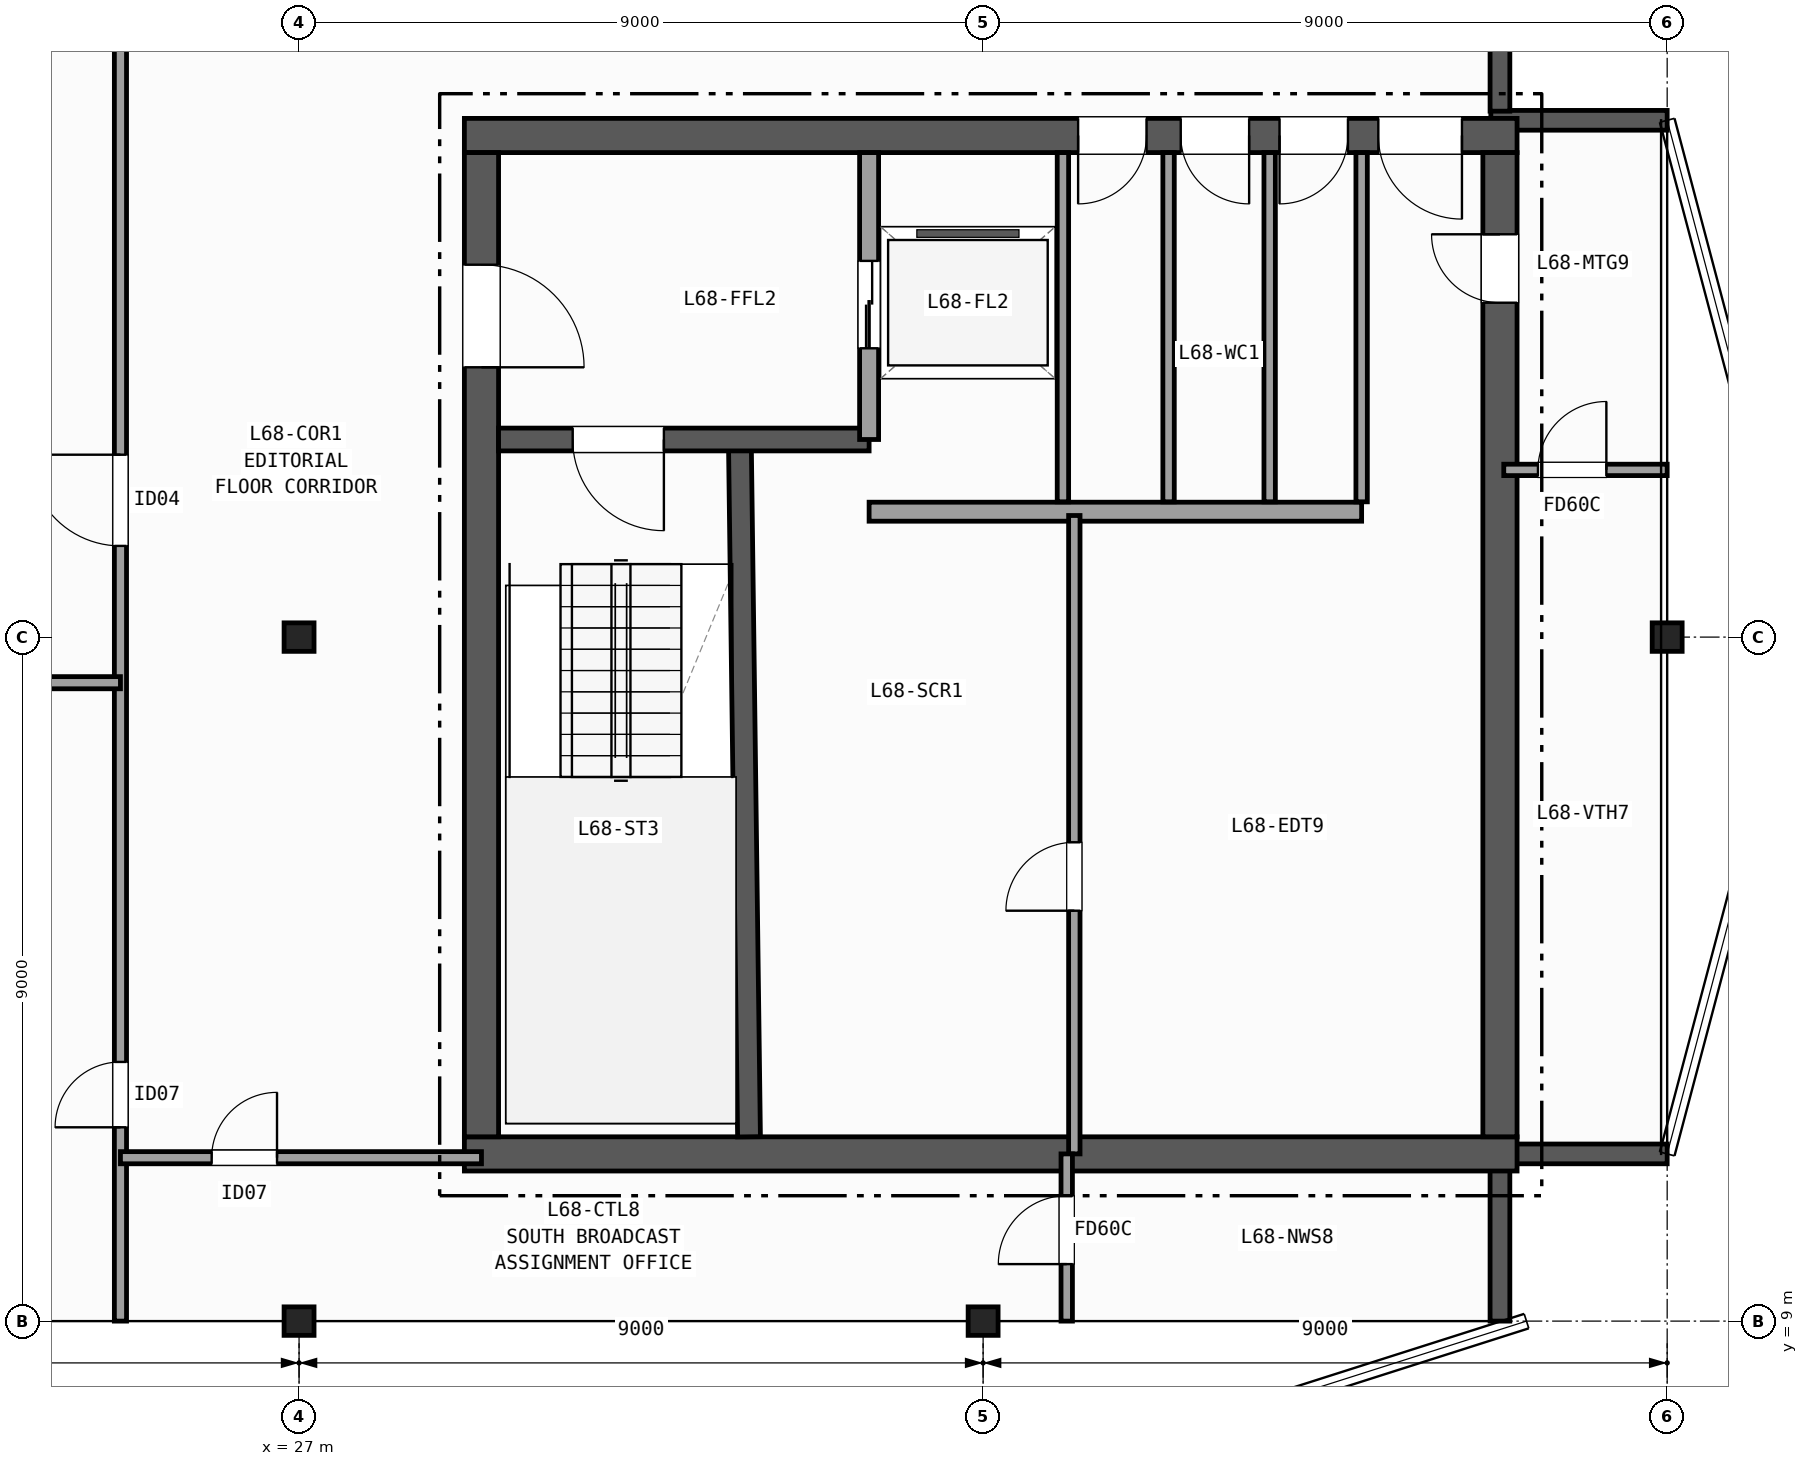
"""IFC4 building model, lengths in metres.
Left out: names, types, materials, properties, quantities, classifications, styles, units other than length and angle.
Written with IfcOpenShell. Run it as: python <this file> out.ifc"""

import sys

from ifc_helpers import new_model, si_unit, direction, frame, frame_2d, origin, origin_2d, place, context, subcontext, project, spatial, rectangle, i_section, extrude, element, fill, save


model = new_model("IFC4")
c1 = context("Model", 3, precision=1e-05, world=origin(), true_north=direction((0.0, 1.0)))
c2 = subcontext(c1, "Body", "Model", "MODEL_VIEW")
j1 = project(units=[si_unit("LENGTHUNIT", "METRE"), si_unit("PLANEANGLEUNIT", "RADIAN")], contexts=[c1])
p1 = place(None, origin())
s1 = spatial("IfcSite", under=j1, at=p1, CompositionType="ELEMENT")
p2 = place(p1, origin())
s2 = spatial("IfcBuilding", under=s1, at=p2, CompositionType="ELEMENT")
p3 = place(p2, frame((0.0, 0.0, 270.4)))
s3 = spatial("IfcBuildingStorey", under=s2, at=p3, CompositionType="ELEMENT", Elevation=270.4)
for number, where, z_axis, x_axis in (
    (1, (27.0, 9.0, 0.0), (0.0, 0.0, 1.0), (1.0, 0.0, 0.0)),
    (2, (27.0, 18.0, 0.0), (0.0, 0.0, 1.0), (1.0, 0.0, 0.0)),
    (3, (36.0, 9.0, 0.0), (0.0, 0.0, 1.0), (1.0, 0.0, 0.0)),
    (4, (45.0, 18.0, 0.0), (0.0, 0.0, 1.0), (1.0, 0.0, 0.0)),
):
    element("IfcColumn", number, at=place(p3, frame(where, z_axis=z_axis, x_axis=x_axis)), inside=s3, PredefinedType="COLUMN", context=c2, shape_type="SweptSolid", body=[
        extrude(i_section(OverallWidth=0.394, OverallDepth=0.375, WebThickness=0.017, FlangeThickness=0.028, FilletRadius=0.015, at=origin_2d()), origin(), (0.0, 0.0, 1.0), 3.7),
    ])
p4 = place(p3, frame((42.8, 9.0, 0.0), z_axis=(0.0, 0.0, 1.0), x_axis=(0.0, 1.0, 0.0)))
e5 = element("IfcWall", 5, at=p4, inside=s3, PredefinedType="SOLIDWALL", context=c2, shape_type="SweptSolid", body=[
    extrude(rectangle(XDim=2.08, YDim=0.26, at=frame_2d((1.04, 0.0))), origin(), (0.0, 0.0, 1.0), 3.42),
])
for number, where, z_axis, x_axis in (
    (6, (42.68, 11.2, 0.0), (0.0, 0.0, 1.0), (1.0, 0.0, 0.0)),
    (7, (45.0, 24.8, 0.0), (0.0, 0.0, 1.0), (-1.0, 0.0, 0.0)),
):
    element("IfcWall", number, at=place(p3, frame(where, z_axis=z_axis, x_axis=x_axis)), inside=s3, PredefinedType="SOLIDWALL", context=c2, shape_type="SweptSolid", body=[
        extrude(rectangle(XDim=2.32, YDim=0.26, at=frame_2d((1.16, 0.0))), origin(), (0.0, 0.0, 1.0), 3.42),
    ])
p5 = place(p3, frame((42.8, 24.92, 0.0), z_axis=(0.0, 0.0, 1.0), x_axis=(0.0, 1.0, 0.0)))
e8 = element("IfcWall", 8, at=p5, inside=s3, PredefinedType="SOLIDWALL", context=c2, shape_type="SweptSolid", body=[
    extrude(rectangle(XDim=2.08, YDim=0.26, at=frame_2d((1.04, 0.0))), origin(), (0.0, 0.0, 1.0), 3.42),
])
p6 = place(p3, frame((29.175, 11.2, 0.0), z_axis=(0.0, 0.0, 1.0), x_axis=(1.0, 0.0, 0.0)))
e9 = element("IfcWall", 9, at=p6, inside=s3, PredefinedType="SHEAR", context=c2, shape_type="SweptSolid", body=[
    extrude(rectangle(XDim=13.85, YDim=0.45, at=frame_2d((6.925, 0.0))), origin(), (0.0, 0.0, 1.0), 3.42),
])
p7 = place(p3, frame((43.025, 24.6, 0.0), z_axis=(0.0, 0.0, 1.0), x_axis=(-1.0, 0.0, 0.0)))
e10 = element("IfcWall", 10, at=p7, inside=s3, PredefinedType="SHEAR", context=c2, shape_type="SweptSolid", body=[
    extrude(rectangle(XDim=13.85, YDim=0.45, at=frame_2d((6.925, 0.0))), origin(), (0.0, 0.0, 1.0), 3.42),
])
p8 = place(p7, frame((0.725, 0.0, 0.0)))
e11 = element("IfcOpeningElement", 11, at=p8, cuts=e10, PredefinedType="OPENING", context=c2, shape_type="SweptSolid", body=[
    extrude(rectangle(XDim=1.1, YDim=2.15, at=frame_2d((0.55, 1.075))), frame((0.0, 0.235, 0.0), z_axis=(0.0, -1.0, 0.0), x_axis=(1.0, 0.0, 0.0)), (0.0, 0.0, 1.0), 0.47),
])
p9 = place(p7, frame((2.225, 0.0, 0.0)))
e12 = element("IfcOpeningElement", 12, at=p9, cuts=e10, PredefinedType="OPENING", context=c2, shape_type="SweptSolid", body=[
    extrude(rectangle(XDim=0.9, YDim=2.1, at=frame_2d((0.45, 1.05))), frame((0.0, 0.235, 0.0), z_axis=(0.0, -1.0, 0.0), x_axis=(1.0, 0.0, 0.0)), (0.0, 0.0, 1.0), 0.47),
])
p10 = place(p7, frame((3.525, 0.0, 0.0)))
e13 = element("IfcOpeningElement", 13, at=p10, cuts=e10, PredefinedType="OPENING", context=c2, shape_type="SweptSolid", body=[
    extrude(rectangle(XDim=0.9, YDim=2.1, at=frame_2d((0.45, 1.05))), frame((0.0, 0.235, 0.0), z_axis=(0.0, -1.0, 0.0), x_axis=(1.0, 0.0, 0.0)), (0.0, 0.0, 1.0), 0.47),
])
p11 = place(p7, frame((4.875, 0.0, 0.0)))
e14 = element("IfcOpeningElement", 14, at=p11, cuts=e10, PredefinedType="OPENING", context=c2, shape_type="SweptSolid", body=[
    extrude(rectangle(XDim=0.9, YDim=2.1, at=frame_2d((0.45, 1.05))), frame((0.0, 0.235, 0.0), z_axis=(0.0, -1.0, 0.0), x_axis=(1.0, 0.0, 0.0)), (0.0, 0.0, 1.0), 0.47),
])
p12 = place(p3, frame((29.4, 24.375, 0.0), z_axis=(0.0, 0.0, 1.0), x_axis=(0.0, -1.0, 0.0)))
e15 = element("IfcWall", 15, at=p12, inside=s3, PredefinedType="SHEAR", context=c2, shape_type="SweptSolid", body=[
    extrude(rectangle(XDim=12.95, YDim=0.45, at=frame_2d((6.475, 0.0))), origin(), (0.0, 0.0, 1.0), 3.42),
])
p13 = place(p12, frame((1.475, 0.0, 0.0)))
e16 = element("IfcOpeningElement", 16, at=p13, cuts=e15, PredefinedType="OPENING", context=c2, shape_type="SweptSolid", body=[
    extrude(rectangle(XDim=1.35, YDim=2.15, at=frame_2d((0.675, 1.075))), frame((0.0, 0.235, 0.0), z_axis=(0.0, -1.0, 0.0), x_axis=(1.0, 0.0, 0.0)), (0.0, 0.0, 1.0), 0.47),
])
p14 = place(p3, frame((42.8, 11.425, 0.0), z_axis=(0.0, 0.0, 1.0), x_axis=(0.0, 1.0, 0.0)))
e17 = element("IfcWall", 17, at=p14, inside=s3, PredefinedType="SHEAR", context=c2, shape_type="SweptSolid", body=[
    extrude(rectangle(XDim=12.95, YDim=0.45, at=frame_2d((6.475, 0.0))), origin(), (0.0, 0.0, 1.0), 3.42),
])
p15 = place(p14, frame((10.975, 0.0, 0.0)))
e18 = element("IfcOpeningElement", 18, at=p15, cuts=e17, PredefinedType="OPENING", context=c2, shape_type="SweptSolid", body=[
    extrude(rectangle(XDim=0.9, YDim=2.1, at=frame_2d((0.45, 1.05))), frame((0.0, 0.235, 0.0), z_axis=(0.0, -1.0, 0.0), x_axis=(1.0, 0.0, 0.0)), (0.0, 0.0, 1.0), 0.47),
])
p16 = place(p3, frame((32.92, 11.425, 0.0), z_axis=(0.0, 0.0, 1.0), x_axis=(-0.013135638869, 0.999913723774, 0.0)))
e19 = element("IfcWall", 19, at=p16, inside=s3, PredefinedType="SHEAR", context=c2, shape_type="SweptSolid", body=[
    extrude(rectangle(XDim=9.126, YDim=0.3, at=frame_2d((4.563, 0.0))), origin(), (0.0, 0.0, 1.0), 3.42),
])
p17 = place(p3, frame((34.5, 20.6, 0.0), z_axis=(0.0, 0.0, 1.0), x_axis=(-1.0, 0.0, 0.0)))
e20 = element("IfcWall", 20, at=p17, inside=s3, PredefinedType="SHEAR", context=c2, shape_type="SweptSolid", body=[
    extrude(rectangle(XDim=4.875, YDim=0.3, at=frame_2d((2.438, 0.0))), origin(), (0.0, 0.0, 1.0), 3.42),
])
p18 = place(p17, frame((2.7, 0.0, 0.0)))
e21 = element("IfcOpeningElement", 21, at=p18, cuts=e20, PredefinedType="OPENING", context=c2, shape_type="SweptSolid", body=[
    extrude(rectangle(XDim=1.2, YDim=2.15, at=frame_2d((0.6, 1.075))), frame((0.0, 0.16, 0.0), z_axis=(0.0, -1.0, 0.0), x_axis=(1.0, 0.0, 0.0)), (0.0, 0.0, 1.0), 0.32),
])
p19 = place(p3, frame((34.5, 20.6, 0.0), z_axis=(0.0, 0.0, 1.0), x_axis=(0.0, 1.0, 0.0)))
e22 = element("IfcWall", 22, at=p19, inside=s3, PredefinedType="PARTITIONING", context=c2, shape_type="SweptSolid", body=[
    extrude(rectangle(XDim=3.775, YDim=0.25, at=frame_2d((1.887, 0.0))), origin(), (0.0, 0.0, 1.0), 3.42),
])
p20 = place(p19, frame((1.2, 0.0, 0.0)))
e23 = element("IfcOpeningElement", 23, at=p20, cuts=e22, PredefinedType="OPENING", context=c2, shape_type="SweptSolid", body=[
    extrude(rectangle(XDim=1.15, YDim=2.15, at=frame_2d((0.575, 1.075))), frame((0.0, 0.135, 0.0), z_axis=(0.0, -1.0, 0.0), x_axis=(1.0, 0.0, 0.0)), (0.0, 0.0, 1.0), 0.27),
])
p21 = place(p3, frame((34.5, 19.65, 0.0), z_axis=(0.0, 0.0, 1.0), x_axis=(1.0, 0.0, 0.0)))
e24 = element("IfcWall", 24, at=p21, inside=s3, PredefinedType="PARTITIONING", context=c2, shape_type="SweptSolid", body=[
    extrude(rectangle(XDim=6.48, YDim=0.25, at=frame_2d((3.24, 0.0))), origin(), (0.0, 0.0, 1.0), 3.42),
])
p22 = place(p3, frame((37.2, 11.2, 0.0), z_axis=(0.0, 0.0, 1.0), x_axis=(0.0, 1.0, 0.0)))
e25 = element("IfcWall", 25, at=p22, inside=s3, PredefinedType="PARTITIONING", context=c2, shape_type="SweptSolid", body=[
    extrude(rectangle(XDim=8.4, YDim=0.15, at=frame_2d((4.2, 0.0))), origin(), (0.0, 0.0, 1.0), 3.42),
])
p23 = place(p22, frame((3.2, 0.0, 0.0)))
e26 = element("IfcOpeningElement", 26, at=p23, cuts=e25, PredefinedType="OPENING", context=c2, shape_type="SweptSolid", body=[
    extrude(rectangle(XDim=0.9, YDim=2.1, at=frame_2d((0.45, 1.05))), frame((0.0, 0.085, 0.0), z_axis=(0.0, -1.0, 0.0), x_axis=(1.0, 0.0, 0.0)), (0.0, 0.0, 1.0), 0.17),
])
for number, where, z_axis, x_axis in (
    (27, (37.05, 19.78, 0.0), (0.0, 0.0, 1.0), (0.0, 1.0, 0.0)),
    (28, (38.44, 19.78, 0.0), (0.0, 0.0, 1.0), (0.0, 1.0, 0.0)),
    (29, (39.77, 19.78, 0.0), (0.0, 0.0, 1.0), (0.0, 1.0, 0.0)),
    (30, (40.98, 19.78, 0.0), (0.0, 0.0, 1.0), (0.0, 1.0, 0.0)),
):
    element("IfcWall", number, at=place(p3, frame(where, z_axis=z_axis, x_axis=x_axis)), inside=s3, PredefinedType="PARTITIONING", context=c2, shape_type="SweptSolid", body=[
        extrude(rectangle(XDim=4.595, YDim=0.15, at=frame_2d((2.297, 0.0))), origin(), (0.0, 0.0, 1.0), 3.42),
    ])
p24 = place(p3, frame((24.65, 9.0, 0.0), z_axis=(0.0, 0.0, 1.0), x_axis=(0.0, 1.0, 0.0)))
e31 = element("IfcWall", 31, at=p24, inside=s3, PredefinedType="PARTITIONING", context=c2, shape_type="SweptSolid", body=[
    extrude(rectangle(XDim=19.2, YDim=0.16, at=frame_2d((9.6, 0.0))), origin(), (0.0, 0.0, 1.0), 2.707),
])
p25 = place(p24, frame((10.2, 0.0, 0.0)))
e32 = element("IfcOpeningElement", 32, at=p25, cuts=e31, PredefinedType="OPENING", context=c2, shape_type="SweptSolid", body=[
    extrude(rectangle(XDim=1.2, YDim=2.15, at=frame_2d((0.6, 1.075))), frame((0.0, 0.09, 0.0), z_axis=(0.0, -1.0, 0.0), x_axis=(1.0, 0.0, 0.0)), (0.0, 0.0, 1.0), 0.18),
])
p26 = place(p24, frame((2.55, 0.0, 0.0)))
e33 = element("IfcOpeningElement", 33, at=p26, cuts=e31, PredefinedType="OPENING", context=c2, shape_type="SweptSolid", body=[
    extrude(rectangle(XDim=0.86, YDim=2.05, at=frame_2d((0.43, 1.025))), frame((0.0, 0.09, 0.0), z_axis=(0.0, -1.0, 0.0), x_axis=(1.0, 0.0, 0.0)), (0.0, 0.0, 1.0), 0.18),
])
p27 = place(p3, frame((18.0, 17.4, 0.0), z_axis=(0.0, 0.0, 1.0), x_axis=(1.0, 0.0, 0.0)))
e34 = element("IfcWall", 34, at=p27, inside=s3, PredefinedType="PARTITIONING", context=c2, shape_type="SweptSolid", body=[
    extrude(rectangle(XDim=6.65, YDim=0.16, at=frame_2d((3.325, 0.0))), origin(), (0.0, 0.0, 1.0), 2.789),
])
p28 = place(p3, frame((24.65, 11.15, 0.0), z_axis=(0.0, 0.0, 1.0), x_axis=(1.0, 0.0, 0.0)))
e35 = element("IfcWall", 35, at=p28, inside=s3, PredefinedType="PARTITIONING", context=c2, shape_type="SweptSolid", body=[
    extrude(rectangle(XDim=4.75, YDim=0.16, at=frame_2d((2.375, 0.0))), origin(), (0.0, 0.0, 1.0), 2.792),
])
p29 = place(p28, frame((1.2, 0.0, 0.0)))
e36 = element("IfcOpeningElement", 36, at=p29, cuts=e35, PredefinedType="OPENING", context=c2, shape_type="SweptSolid", body=[
    extrude(rectangle(XDim=0.86, YDim=2.05, at=frame_2d((0.43, 1.025))), frame((0.0, 0.09, 0.0), z_axis=(0.0, -1.0, 0.0), x_axis=(1.0, 0.0, 0.0)), (0.0, 0.0, 1.0), 0.18),
])
p30 = place(p3, frame((37.1, 9.0, 0.0), z_axis=(0.0, 0.0, 1.0), x_axis=(0.0, 1.0, 0.0)))
e37 = element("IfcWall", 37, at=p30, inside=s3, PredefinedType="PARTITIONING", context=c2, shape_type="SweptSolid", body=[
    extrude(rectangle(XDim=2.2, YDim=0.15, at=frame_2d((1.1, 0.0))), origin(), (0.0, 0.0, 1.0), 3.42),
])
p31 = place(p30, frame((0.75, 0.0, 0.0)))
e38 = element("IfcOpeningElement", 38, at=p31, cuts=e37, PredefinedType="OPENING", context=c2, shape_type="SweptSolid", body=[
    extrude(rectangle(XDim=0.9, YDim=2.1, at=frame_2d((0.45, 1.05))), frame((0.0, 0.085, 0.0), z_axis=(0.0, -1.0, 0.0), x_axis=(1.0, 0.0, 0.0)), (0.0, 0.0, 1.0), 0.17),
])
p32 = place(p3, frame((42.85, 20.2, 0.0), z_axis=(0.0, 0.0, 1.0), x_axis=(1.0, 0.0, 0.0)))
e39 = element("IfcWall", 39, at=p32, inside=s3, PredefinedType="PARTITIONING", context=c2, shape_type="SweptSolid", body=[
    extrude(rectangle(XDim=2.15, YDim=0.15, at=frame_2d((1.075, 0.0))), origin(), (0.0, 0.0, 1.0), 3.42),
])
p33 = place(p32, frame((0.45, 0.0, 0.0)))
e40 = element("IfcOpeningElement", 40, at=p33, cuts=e39, PredefinedType="OPENING", context=c2, shape_type="SweptSolid", body=[
    extrude(rectangle(XDim=0.9, YDim=2.1, at=frame_2d((0.45, 1.05))), frame((0.0, 0.085, 0.0), z_axis=(0.0, -1.0, 0.0), x_axis=(1.0, 0.0, 0.0)), (0.0, 0.0, 1.0), 0.17),
])
p34 = place(p18, origin())
e41 = element("IfcDoor", 41, at=p34, inside=s3, OperationType="SINGLE_SWING_LEFT", PredefinedType="DOOR", context=c2, shape_type="SweptSolid", body=[
    extrude(rectangle(XDim=1.2, YDim=2.15, at=frame_2d((0.6, 1.075))), frame((0.0, 0.025, 0.0), z_axis=(0.0, -1.0, 0.0), x_axis=(1.0, 0.0, 0.0)), (0.0, 0.0, 1.0), 0.05),
])
fill(e21, e41)
p35 = place(p13, origin())
e42 = element("IfcDoor", 42, at=p35, inside=s3, OperationType="SINGLE_SWING_RIGHT", PredefinedType="DOOR", context=c2, shape_type="SweptSolid", body=[
    extrude(rectangle(XDim=1.35, YDim=2.15, at=frame_2d((0.675, 1.075))), frame((0.0, 0.025, 0.0), z_axis=(0.0, -1.0, 0.0), x_axis=(1.0, 0.0, 0.0)), (0.0, 0.0, 1.0), 0.05),
])
fill(e16, e42)
p36 = place(p15, origin())
e43 = element("IfcDoor", 43, at=p36, inside=s3, OperationType="SINGLE_SWING_RIGHT", PredefinedType="DOOR", context=c2, shape_type="SweptSolid", body=[
    extrude(rectangle(XDim=0.9, YDim=2.1, at=frame_2d((0.45, 1.05))), frame((0.0, 0.025, 0.0), z_axis=(0.0, -1.0, 0.0), x_axis=(1.0, 0.0, 0.0)), (0.0, 0.0, 1.0), 0.05),
])
fill(e18, e43)
p37 = place(p8, origin())
e44 = element("IfcDoor", 44, at=p37, inside=s3, OperationType="SINGLE_SWING_LEFT", PredefinedType="DOOR", context=c2, shape_type="SweptSolid", body=[
    extrude(rectangle(XDim=1.1, YDim=2.15, at=frame_2d((0.55, 1.075))), frame((0.0, 0.025, 0.0), z_axis=(0.0, -1.0, 0.0), x_axis=(1.0, 0.0, 0.0)), (0.0, 0.0, 1.0), 0.05),
])
fill(e11, e44)
p38 = place(p9, origin())
e45 = element("IfcDoor", 45, at=p38, inside=s3, OperationType="SINGLE_SWING_RIGHT", PredefinedType="DOOR", context=c2, shape_type="SweptSolid", body=[
    extrude(rectangle(XDim=0.9, YDim=2.1, at=frame_2d((0.45, 1.05))), frame((0.0, 0.025, 0.0), z_axis=(0.0, -1.0, 0.0), x_axis=(1.0, 0.0, 0.0)), (0.0, 0.0, 1.0), 0.05),
])
fill(e12, e45)
p39 = place(p10, origin())
e46 = element("IfcDoor", 46, at=p39, inside=s3, OperationType="SINGLE_SWING_LEFT", PredefinedType="DOOR", context=c2, shape_type="SweptSolid", body=[
    extrude(rectangle(XDim=0.9, YDim=2.1, at=frame_2d((0.45, 1.05))), frame((0.0, 0.025, 0.0), z_axis=(0.0, -1.0, 0.0), x_axis=(1.0, 0.0, 0.0)), (0.0, 0.0, 1.0), 0.05),
])
fill(e13, e46)
p40 = place(p11, origin())
e47 = element("IfcDoor", 47, at=p40, inside=s3, OperationType="SINGLE_SWING_RIGHT", PredefinedType="DOOR", context=c2, shape_type="SweptSolid", body=[
    extrude(rectangle(XDim=0.9, YDim=2.1, at=frame_2d((0.45, 1.05))), frame((0.0, 0.025, 0.0), z_axis=(0.0, -1.0, 0.0), x_axis=(1.0, 0.0, 0.0)), (0.0, 0.0, 1.0), 0.05),
])
fill(e14, e47)
p41 = place(p20, origin())
e48 = element("IfcDoor", 48, at=p41, inside=s3, OperationType="DOUBLE_DOOR_SLIDING", PredefinedType="DOOR", context=c2, shape_type="SweptSolid", body=[
    extrude(rectangle(XDim=1.15, YDim=2.15, at=frame_2d((0.575, 1.075))), frame((0.0, 0.025, 0.0), z_axis=(0.0, -1.0, 0.0), x_axis=(1.0, 0.0, 0.0)), (0.0, 0.0, 1.0), 0.05),
])
fill(e23, e48)
p42 = place(p23, origin())
e49 = element("IfcDoor", 49, at=p42, inside=s3, OperationType="SINGLE_SWING_LEFT", PredefinedType="DOOR", context=c2, shape_type="SweptSolid", body=[
    extrude(rectangle(XDim=0.9, YDim=2.1, at=frame_2d((0.45, 1.05))), frame((0.0, 0.025, 0.0), z_axis=(0.0, -1.0, 0.0), x_axis=(1.0, 0.0, 0.0)), (0.0, 0.0, 1.0), 0.05),
])
fill(e26, e49)
p43 = place(p25, origin())
e50 = element("IfcDoor", 50, at=p43, inside=s3, OperationType="SINGLE_SWING_RIGHT", PredefinedType="DOOR", context=c2, shape_type="SweptSolid", body=[
    extrude(rectangle(XDim=1.2, YDim=2.15, at=frame_2d((0.6, 1.075))), frame((0.0, 0.025, 0.0), z_axis=(0.0, -1.0, 0.0), x_axis=(1.0, 0.0, 0.0)), (0.0, 0.0, 1.0), 0.05),
])
fill(e32, e50)
p44 = place(p26, origin())
e51 = element("IfcDoor", 51, at=p44, inside=s3, OperationType="SINGLE_SWING_LEFT", PredefinedType="DOOR", context=c2, shape_type="SweptSolid", body=[
    extrude(rectangle(XDim=0.86, YDim=2.05, at=frame_2d((0.43, 1.025))), frame((0.0, 0.025, 0.0), z_axis=(0.0, -1.0, 0.0), x_axis=(1.0, 0.0, 0.0)), (0.0, 0.0, 1.0), 0.05),
])
fill(e33, e51)
p45 = place(p29, origin())
e52 = element("IfcDoor", 52, at=p45, inside=s3, OperationType="SINGLE_SWING_RIGHT", PredefinedType="DOOR", context=c2, shape_type="SweptSolid", body=[
    extrude(rectangle(XDim=0.86, YDim=2.05, at=frame_2d((0.43, 1.025))), frame((0.0, 0.025, 0.0), z_axis=(0.0, -1.0, 0.0), x_axis=(1.0, 0.0, 0.0)), (0.0, 0.0, 1.0), 0.05),
])
fill(e36, e52)
p46 = place(p31, origin())
e53 = element("IfcDoor", 53, at=p46, inside=s3, OperationType="SINGLE_SWING_LEFT", PredefinedType="DOOR", context=c2, shape_type="SweptSolid", body=[
    extrude(rectangle(XDim=0.9, YDim=2.1, at=frame_2d((0.45, 1.05))), frame((0.0, 0.025, 0.0), z_axis=(0.0, -1.0, 0.0), x_axis=(1.0, 0.0, 0.0)), (0.0, 0.0, 1.0), 0.05),
])
fill(e38, e53)
p47 = place(p33, origin())
e54 = element("IfcDoor", 54, at=p47, inside=s3, OperationType="SINGLE_SWING_RIGHT", PredefinedType="DOOR", context=c2, shape_type="SweptSolid", body=[
    extrude(rectangle(XDim=0.9, YDim=2.1, at=frame_2d((0.45, 1.05))), frame((0.0, 0.025, 0.0), z_axis=(0.0, -1.0, 0.0), x_axis=(1.0, 0.0, 0.0)), (0.0, 0.0, 1.0), 0.05),
])
fill(e40, e54)
save(model, sys.argv[1])
